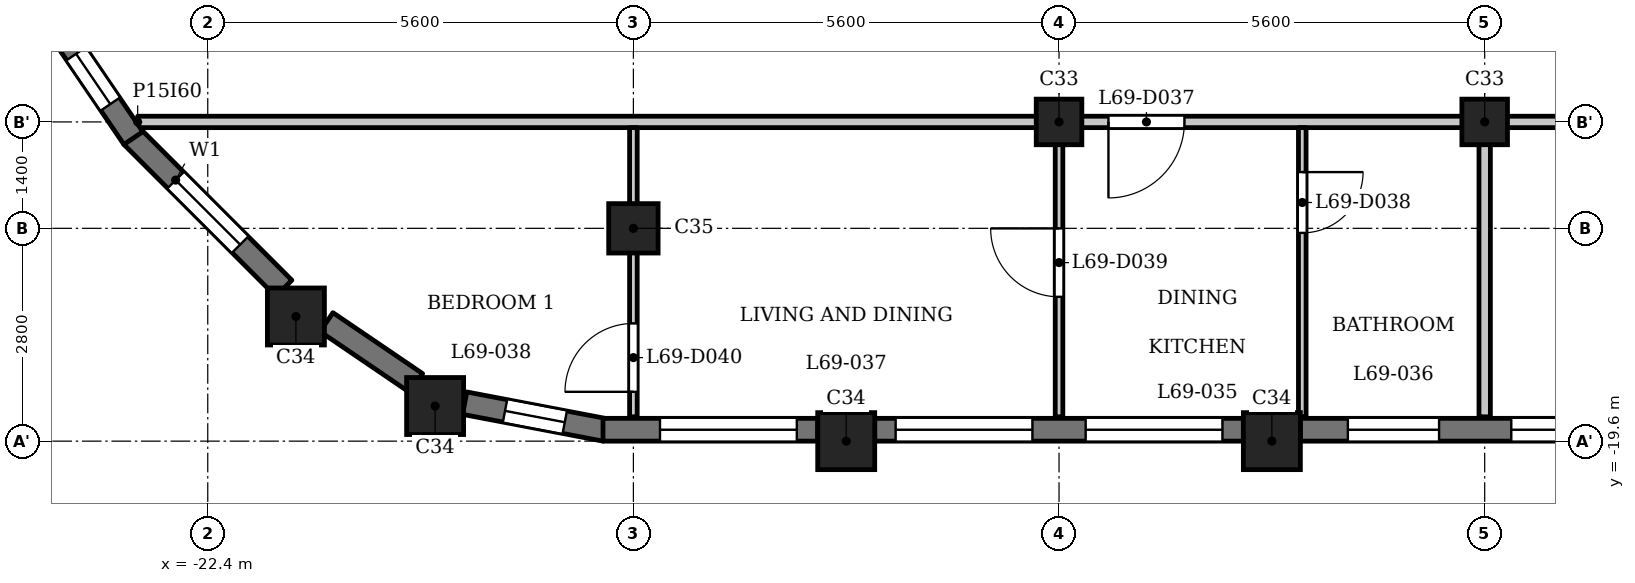
"""IFC4 building model, lengths in metres.
Left out: names, types, materials, properties, quantities, classifications, styles, units other than length and angle.
Written with IfcOpenShell. Run it as: python <this file> out.ifc"""

import sys

from ifc_helpers import new_model, si_unit, direction, frame, frame_2d, origin, origin_2d, place, context, subcontext, project, spatial, rectangle, extrude, element, fill, save


model = new_model("IFC4")
c1 = context("Model", 3, precision=1e-05, world=origin(), true_north=direction((0.0, 1.0)))
c2 = subcontext(c1, "Body", "Model", "MODEL_VIEW")
j1 = project(units=[si_unit("LENGTHUNIT", "METRE"), si_unit("PLANEANGLEUNIT", "RADIAN")], contexts=[c1])
p1 = place(None, origin())
s1 = spatial("IfcSite", under=j1, at=p1, CompositionType="ELEMENT")
p2 = place(p1, origin())
s2 = spatial("IfcBuilding", under=s1, at=p2, CompositionType="ELEMENT")
p3 = place(p2, frame((0.0, 0.0, 266.2)))
s3 = spatial("IfcBuildingStorey", under=s2, at=p3, CompositionType="ELEMENT", Elevation=266.2)
for number, where, z_axis, x_axis in (
    (1, (-19.409, -19.138, 0.0), (0.0, 0.0, 1.0), (1.0, 0.0, 0.0)),
    (2, (-14.0, -19.6, 0.0), (0.0, 0.0, 1.0), (1.0, 0.0, 0.0)),
    (3, (-8.4, -19.6, 0.0), (0.0, 0.0, 1.0), (1.0, 0.0, 0.0)),
    (4, (-21.24, -17.96, 0.0), (0.0, 0.0, 1.0), (1.0, 0.0, 0.0)),
):
    element("IfcColumn", number, at=place(p3, frame(where, z_axis=z_axis, x_axis=x_axis)), inside=s3, PredefinedType="COLUMN", context=c2, shape_type="SweptSolid", body=[
        extrude(rectangle(XDim=0.75, YDim=0.75, at=origin_2d()), origin(), (0.0, 0.0, 1.0), 3.5),
    ])
p4 = place(p3, frame((-16.8, -16.8, 0.0), z_axis=(0.0, 0.0, 1.0), x_axis=(1.0, 0.0, 0.0)))
e5 = element("IfcColumn", 5, at=p4, inside=s3, PredefinedType="COLUMN", context=c2, shape_type="SweptSolid", body=[
    extrude(rectangle(XDim=0.65, YDim=0.65, at=origin_2d()), origin(), (0.0, 0.0, 1.0), 3.5),
])
for number, where, z_axis, x_axis in (
    (6, (-11.2, -15.4, 0.0), (0.0, 0.0, 1.0), (1.0, 0.0, 0.0)),
    (7, (-5.6, -15.4, 0.0), (0.0, 0.0, 1.0), (1.0, 0.0, 0.0)),
):
    element("IfcColumn", number, at=place(p3, frame(where, z_axis=z_axis, x_axis=x_axis)), inside=s3, PredefinedType="COLUMN", context=c2, shape_type="SweptSolid", body=[
        extrude(rectangle(XDim=0.6, YDim=0.6, at=origin_2d()), origin(), (0.0, 0.0, 1.0), 3.5),
    ])
p5 = place(p3, frame((-23.397, -15.591, 0.0), z_axis=(0.0, 0.0, 1.0), x_axis=(0.707106781187, -0.707106781187, 0.0)))
e8 = element("IfcWall", 8, at=p5, inside=s3, PredefinedType="SOLIDWALL", context=c2, shape_type="SweptSolid", body=[
    extrude(rectangle(XDim=2.825, YDim=0.3, at=frame_2d((1.413, 0.0))), origin(), (0.0, 0.0, 1.0), 2.55),
])
p6 = place(p5, frame((0.812, 0.0, 0.6)))
e9 = element("IfcOpeningElement", 9, at=p6, cuts=e8, PredefinedType="OPENING", context=c2, shape_type="SweptSolid", body=[
    extrude(rectangle(XDim=1.2, YDim=1.55, at=frame_2d((0.6, 0.775))), frame((0.0, 0.16, 0.0), z_axis=(0.0, -1.0, 0.0), x_axis=(1.0, 0.0, 0.0)), (0.0, 0.0, 1.0), 0.32),
])
p7 = place(p3, frame((-20.837, -18.034, 0.0), z_axis=(0.0, 0.0, 1.0), x_axis=(0.827095130818, -0.562061957952, 0.0)))
e10 = element("IfcWall", 10, at=p7, inside=s3, PredefinedType="SOLIDWALL", context=c2, shape_type="SweptSolid", body=[
    extrude(rectangle(XDim=1.427, YDim=0.3, at=frame_2d((0.713, 0.0))), origin(), (0.0, 0.0, 1.0), 2.55),
])
p8 = place(p3, frame((-19.02, -19.1, 0.0), z_axis=(0.0, 0.0, 1.0), x_axis=(0.982284001233, -0.187398348234, 0.0)))
e11 = element("IfcWall", 11, at=p8, inside=s3, PredefinedType="SOLIDWALL", context=c2, shape_type="SweptSolid", body=[
    extrude(rectangle(XDim=1.881, YDim=0.3, at=frame_2d((0.941, 0.0))), origin(), (0.0, 0.0, 1.0), 2.55),
])
p9 = place(p8, frame((0.541, 0.0, 0.6)))
e12 = element("IfcOpeningElement", 12, at=p9, cuts=e11, PredefinedType="OPENING", context=c2, shape_type="SweptSolid", body=[
    extrude(rectangle(XDim=0.8, YDim=1.55, at=frame_2d((0.4, 0.775))), frame((0.0, 0.16, 0.0), z_axis=(0.0, -1.0, 0.0), x_axis=(1.0, 0.0, 0.0)), (0.0, 0.0, 1.0), 0.32),
])
p10 = place(p3, frame((-17.2, -19.45, 0.0), z_axis=(0.0, 0.0, 1.0), x_axis=(1.0, 0.0, 0.0)))
e13 = element("IfcWall", 13, at=p10, inside=s3, PredefinedType="SOLIDWALL", context=c2, shape_type="SweptSolid", body=[
    extrude(rectangle(XDim=2.825, YDim=0.3, at=frame_2d((1.413, 0.0))), origin(), (0.0, 0.0, 1.0), 2.55),
])
p11 = place(p10, frame((0.75, 0.0, 0.9)))
e14 = element("IfcOpeningElement", 14, at=p11, cuts=e13, PredefinedType="OPENING", context=c2, shape_type="SweptSolid", body=[
    extrude(rectangle(XDim=1.8, YDim=1.25, at=frame_2d((0.9, 0.625))), frame((0.0, 0.16, 0.0), z_axis=(0.0, -1.0, 0.0), x_axis=(1.0, 0.0, 0.0)), (0.0, 0.0, 1.0), 0.32),
])
p12 = place(p3, frame((-13.625, -19.45, 0.0), z_axis=(0.0, 0.0, 1.0), x_axis=(1.0, 0.0, 0.0)))
e15 = element("IfcWall", 15, at=p12, inside=s3, PredefinedType="SOLIDWALL", context=c2, shape_type="SweptSolid", body=[
    extrude(rectangle(XDim=4.85, YDim=0.3, at=frame_2d((2.425, 0.0))), origin(), (0.0, 0.0, 1.0), 2.55),
])
p13 = place(p12, frame((0.275, 0.0, 0.9)))
e16 = element("IfcOpeningElement", 16, at=p13, cuts=e15, PredefinedType="OPENING", context=c2, shape_type="SweptSolid", body=[
    extrude(rectangle(XDim=1.8, YDim=1.25, at=frame_2d((0.9, 0.625))), frame((0.0, 0.16, 0.0), z_axis=(0.0, -1.0, 0.0), x_axis=(1.0, 0.0, 0.0)), (0.0, 0.0, 1.0), 0.32),
])
p14 = place(p12, frame((2.775, 0.0, 0.9)))
e17 = element("IfcOpeningElement", 17, at=p14, cuts=e15, PredefinedType="OPENING", context=c2, shape_type="SweptSolid", body=[
    extrude(rectangle(XDim=1.8, YDim=1.25, at=frame_2d((0.9, 0.625))), frame((0.0, 0.16, 0.0), z_axis=(0.0, -1.0, 0.0), x_axis=(1.0, 0.0, 0.0)), (0.0, 0.0, 1.0), 0.32),
])
p15 = place(p3, frame((-8.025, -19.45, 0.0), z_axis=(0.0, 0.0, 1.0), x_axis=(1.0, 0.0, 0.0)))
e18 = element("IfcWall", 18, at=p15, inside=s3, PredefinedType="SOLIDWALL", context=c2, shape_type="SweptSolid", body=[
    extrude(rectangle(XDim=4.85, YDim=0.3, at=frame_2d((2.425, 0.0))), origin(), (0.0, 0.0, 1.0), 2.55),
])
p16 = place(p15, frame((0.625, 0.0, 0.6)))
e19 = element("IfcOpeningElement", 19, at=p16, cuts=e18, PredefinedType="OPENING", context=c2, shape_type="SweptSolid", body=[
    extrude(rectangle(XDim=1.2, YDim=1.55, at=frame_2d((0.6, 0.775))), frame((0.0, 0.16, 0.0), z_axis=(0.0, -1.0, 0.0), x_axis=(1.0, 0.0, 0.0)), (0.0, 0.0, 1.0), 0.32),
])
p17 = place(p15, frame((2.775, 0.0, 0.9)))
e20 = element("IfcOpeningElement", 20, at=p17, cuts=e18, PredefinedType="OPENING", context=c2, shape_type="SweptSolid", body=[
    extrude(rectangle(XDim=1.8, YDim=1.25, at=frame_2d((0.9, 0.625))), frame((0.0, 0.16, 0.0), z_axis=(0.0, -1.0, 0.0), x_axis=(1.0, 0.0, 0.0)), (0.0, 0.0, 1.0), 0.32),
])
p18 = place(p3, frame((-24.436, -14.057, 0.0), z_axis=(0.0, 0.0, 1.0), x_axis=(0.562075713892, -0.827085782645, 0.0)))
e21 = element("IfcWall", 21, at=p18, inside=s3, PredefinedType="SOLIDWALL", context=c2, shape_type="SweptSolid", body=[
    extrude(rectangle(XDim=1.881, YDim=0.3, at=frame_2d((0.94, 0.0))), origin(), (0.0, 0.0, 1.0), 2.55),
])
p19 = place(p18, frame((0.541, 0.0, 0.6)))
e22 = element("IfcOpeningElement", 22, at=p19, cuts=e21, PredefinedType="OPENING", context=c2, shape_type="SweptSolid", body=[
    extrude(rectangle(XDim=0.8, YDim=1.55, at=frame_2d((0.4, 0.775))), frame((0.0, 0.16, 0.0), z_axis=(0.0, -1.0, 0.0), x_axis=(1.0, 0.0, 0.0)), (0.0, 0.0, 1.0), 0.32),
])
p20 = place(p3, frame((-23.322, -15.4, 0.0), z_axis=(0.0, 0.0, 1.0), x_axis=(1.0, 0.0, 0.0)))
e23 = element("IfcWall", 23, at=p20, inside=s3, PredefinedType="PARTITIONING", context=c2, shape_type="SweptSolid", body=[
    extrude(rectangle(XDim=46.872, YDim=0.15, at=frame_2d((23.436, 0.0))), origin(), (0.0, 0.0, 1.0), 3.2),
])
p21 = place(p20, frame((12.772, 0.0, 0.0)))
e24 = element("IfcOpeningElement", 24, at=p21, cuts=e23, PredefinedType="OPENING", context=c2, shape_type="SweptSolid", body=[
    extrude(rectangle(XDim=1.0, YDim=2.1, at=frame_2d((0.5, 1.05))), frame((0.0, 0.085, 0.0), z_axis=(0.0, -1.0, 0.0), x_axis=(1.0, 0.0, 0.0)), (0.0, 0.0, 1.0), 0.17),
])
p22 = place(p20, frame((29.572, 0.0, 0.0)))
e25 = element("IfcOpeningElement", 25, at=p22, cuts=e23, PredefinedType="OPENING", context=c2, shape_type="SweptSolid", body=[
    extrude(rectangle(XDim=1.0, YDim=2.1, at=frame_2d((0.5, 1.05))), frame((0.0, 0.085, 0.0), z_axis=(0.0, -1.0, 0.0), x_axis=(1.0, 0.0, 0.0)), (0.0, 0.0, 1.0), 0.17),
])
p23 = place(p20, frame((37.572, 0.0, 0.0)))
e26 = element("IfcOpeningElement", 26, at=p23, cuts=e23, PredefinedType="OPENING", context=c2, shape_type="SweptSolid", body=[
    extrude(rectangle(XDim=1.0, YDim=2.1, at=frame_2d((0.5, 1.05))), frame((0.0, 0.085, 0.0), z_axis=(0.0, -1.0, 0.0), x_axis=(1.0, 0.0, 0.0)), (0.0, 0.0, 1.0), 0.17),
])
p24 = place(p3, frame((-16.8, -19.28, 0.0), z_axis=(0.0, 0.0, 1.0), x_axis=(0.0, 1.0, 0.0)))
e27 = element("IfcWall", 27, at=p24, inside=s3, PredefinedType="PARTITIONING", context=c2, shape_type="SweptSolid", body=[
    extrude(rectangle(XDim=3.805, YDim=0.1, at=frame_2d((1.902, 0.0))), origin(), (0.0, 0.0, 1.0), 3.2),
])
p25 = place(p24, frame((0.329, 0.0, 0.0)))
e28 = element("IfcOpeningElement", 28, at=p25, cuts=e27, PredefinedType="OPENING", context=c2, shape_type="SweptSolid", body=[
    extrude(rectangle(XDim=0.9, YDim=2.1, at=frame_2d((0.45, 1.05))), frame((0.0, 0.06, 0.0), z_axis=(0.0, -1.0, 0.0), x_axis=(1.0, 0.0, 0.0)), (0.0, 0.0, 1.0), 0.12),
])
p26 = place(p3, frame((-11.2, -19.28, 0.0), z_axis=(0.0, 0.0, 1.0), x_axis=(0.0, 1.0, 0.0)))
e29 = element("IfcWall", 29, at=p26, inside=s3, PredefinedType="PARTITIONING", context=c2, shape_type="SweptSolid", body=[
    extrude(rectangle(XDim=3.805, YDim=0.1, at=frame_2d((1.902, 0.0))), origin(), (0.0, 0.0, 1.0), 3.2),
])
p27 = place(p26, frame((1.579, 0.0, 0.0)))
e30 = element("IfcOpeningElement", 30, at=p27, cuts=e29, PredefinedType="OPENING", context=c2, shape_type="SweptSolid", body=[
    extrude(rectangle(XDim=0.9, YDim=2.1, at=frame_2d((0.45, 1.05))), frame((0.0, 0.06, 0.0), z_axis=(0.0, -1.0, 0.0), x_axis=(1.0, 0.0, 0.0)), (0.0, 0.0, 1.0), 0.12),
])
p28 = place(p3, frame((-8.0, -19.28, 0.0), z_axis=(0.0, 0.0, 1.0), x_axis=(0.0, 1.0, 0.0)))
e31 = element("IfcWall", 31, at=p28, inside=s3, PredefinedType="PARTITIONING", context=c2, shape_type="SweptSolid", body=[
    extrude(rectangle(XDim=3.805, YDim=0.1, at=frame_2d((1.902, 0.0))), origin(), (0.0, 0.0, 1.0), 3.2),
])
p29 = place(p28, frame((2.42, 0.0, 0.0)))
e32 = element("IfcOpeningElement", 32, at=p29, cuts=e31, PredefinedType="OPENING", context=c2, shape_type="SweptSolid", body=[
    extrude(rectangle(XDim=0.8, YDim=2.1, at=frame_2d((0.4, 1.05))), frame((0.0, 0.06, 0.0), z_axis=(0.0, -1.0, 0.0), x_axis=(1.0, 0.0, 0.0)), (0.0, 0.0, 1.0), 0.12),
])
p30 = place(p3, frame((-5.6, -19.28, 0.0), z_axis=(0.0, 0.0, 1.0), x_axis=(0.0, 1.0, 0.0)))
e33 = element("IfcWall", 33, at=p30, inside=s3, PredefinedType="PARTITIONING", context=c2, shape_type="SweptSolid", body=[
    extrude(rectangle(XDim=3.805, YDim=0.15, at=frame_2d((1.902, 0.0))), origin(), (0.0, 0.0, 1.0), 3.2),
])
p31 = place(p21, origin())
e34 = element("IfcDoor", 34, at=p31, inside=s3, OperationType="SINGLE_SWING_LEFT", PredefinedType="DOOR", context=c2, shape_type="SweptSolid", body=[
    extrude(rectangle(XDim=1.0, YDim=2.1, at=frame_2d((0.5, 1.05))), frame((0.0, 0.025, 0.0), z_axis=(0.0, -1.0, 0.0), x_axis=(1.0, 0.0, 0.0)), (0.0, 0.0, 1.0), 0.05),
])
fill(e24, e34)
p32 = place(p29, origin())
e35 = element("IfcDoor", 35, at=p32, inside=s3, OperationType="SINGLE_SWING_RIGHT", PredefinedType="DOOR", context=c2, shape_type="SweptSolid", body=[
    extrude(rectangle(XDim=0.8, YDim=2.1, at=frame_2d((0.4, 1.05))), frame((0.0, 0.025, 0.0), z_axis=(0.0, -1.0, 0.0), x_axis=(1.0, 0.0, 0.0)), (0.0, 0.0, 1.0), 0.05),
])
fill(e32, e35)
p33 = place(p27, origin())
e36 = element("IfcDoor", 36, at=p33, inside=s3, OperationType="SINGLE_SWING_LEFT", PredefinedType="DOOR", context=c2, shape_type="SweptSolid", body=[
    extrude(rectangle(XDim=0.9, YDim=2.1, at=frame_2d((0.45, 1.05))), frame((0.0, 0.025, 0.0), z_axis=(0.0, -1.0, 0.0), x_axis=(1.0, 0.0, 0.0)), (0.0, 0.0, 1.0), 0.05),
])
fill(e30, e36)
p34 = place(p25, origin())
e37 = element("IfcDoor", 37, at=p34, inside=s3, OperationType="SINGLE_SWING_RIGHT", PredefinedType="DOOR", context=c2, shape_type="SweptSolid", body=[
    extrude(rectangle(XDim=0.9, YDim=2.1, at=frame_2d((0.45, 1.05))), frame((0.0, 0.025, 0.0), z_axis=(0.0, -1.0, 0.0), x_axis=(1.0, 0.0, 0.0)), (0.0, 0.0, 1.0), 0.05),
])
fill(e28, e37)
p35 = place(p6, origin())
e38 = element("IfcWindow", 38, at=p35, inside=s3, PartitioningType="SINGLE_PANEL", PredefinedType="WINDOW", context=c2, shape_type="SweptSolid", body=[
    extrude(rectangle(XDim=1.2, YDim=1.55, at=frame_2d((0.6, 0.775))), frame((0.0, 0.03, 0.0), z_axis=(0.0, -1.0, 0.0), x_axis=(1.0, 0.0, 0.0)), (0.0, 0.0, 1.0), 0.06),
])
fill(e9, e38)
p36 = place(p9, origin())
e39 = element("IfcWindow", 39, at=p36, inside=s3, PartitioningType="SINGLE_PANEL", PredefinedType="WINDOW", context=c2, shape_type="SweptSolid", body=[
    extrude(rectangle(XDim=0.8, YDim=1.55, at=frame_2d((0.4, 0.775))), frame((0.0, 0.03, 0.0), z_axis=(0.0, -1.0, 0.0), x_axis=(1.0, 0.0, 0.0)), (0.0, 0.0, 1.0), 0.06),
])
fill(e12, e39)
p37 = place(p11, origin())
e40 = element("IfcWindow", 40, at=p37, inside=s3, PartitioningType="SINGLE_PANEL", PredefinedType="WINDOW", context=c2, shape_type="SweptSolid", body=[
    extrude(rectangle(XDim=1.8, YDim=1.25, at=frame_2d((0.9, 0.625))), frame((0.0, 0.03, 0.0), z_axis=(0.0, -1.0, 0.0), x_axis=(1.0, 0.0, 0.0)), (0.0, 0.0, 1.0), 0.06),
])
fill(e14, e40)
p38 = place(p13, origin())
e41 = element("IfcWindow", 41, at=p38, inside=s3, PartitioningType="SINGLE_PANEL", PredefinedType="WINDOW", context=c2, shape_type="SweptSolid", body=[
    extrude(rectangle(XDim=1.8, YDim=1.25, at=frame_2d((0.9, 0.625))), frame((0.0, 0.03, 0.0), z_axis=(0.0, -1.0, 0.0), x_axis=(1.0, 0.0, 0.0)), (0.0, 0.0, 1.0), 0.06),
])
fill(e16, e41)
p39 = place(p14, origin())
e42 = element("IfcWindow", 42, at=p39, inside=s3, PartitioningType="SINGLE_PANEL", PredefinedType="WINDOW", context=c2, shape_type="SweptSolid", body=[
    extrude(rectangle(XDim=1.8, YDim=1.25, at=frame_2d((0.9, 0.625))), frame((0.0, 0.03, 0.0), z_axis=(0.0, -1.0, 0.0), x_axis=(1.0, 0.0, 0.0)), (0.0, 0.0, 1.0), 0.06),
])
fill(e17, e42)
p40 = place(p16, origin())
e43 = element("IfcWindow", 43, at=p40, inside=s3, PartitioningType="SINGLE_PANEL", PredefinedType="WINDOW", context=c2, shape_type="SweptSolid", body=[
    extrude(rectangle(XDim=1.2, YDim=1.55, at=frame_2d((0.6, 0.775))), frame((0.0, 0.03, 0.0), z_axis=(0.0, -1.0, 0.0), x_axis=(1.0, 0.0, 0.0)), (0.0, 0.0, 1.0), 0.06),
])
fill(e19, e43)
p41 = place(p17, origin())
e44 = element("IfcWindow", 44, at=p41, inside=s3, PartitioningType="SINGLE_PANEL", PredefinedType="WINDOW", context=c2, shape_type="SweptSolid", body=[
    extrude(rectangle(XDim=1.8, YDim=1.25, at=frame_2d((0.9, 0.625))), frame((0.0, 0.03, 0.0), z_axis=(0.0, -1.0, 0.0), x_axis=(1.0, 0.0, 0.0)), (0.0, 0.0, 1.0), 0.06),
])
fill(e20, e44)
p42 = place(p19, origin())
e45 = element("IfcWindow", 45, at=p42, inside=s3, PartitioningType="SINGLE_PANEL", PredefinedType="WINDOW", context=c2, shape_type="SweptSolid", body=[
    extrude(rectangle(XDim=0.8, YDim=1.55, at=frame_2d((0.4, 0.775))), frame((0.0, 0.03, 0.0), z_axis=(0.0, -1.0, 0.0), x_axis=(1.0, 0.0, 0.0)), (0.0, 0.0, 1.0), 0.06),
])
fill(e22, e45)
save(model, sys.argv[1])
